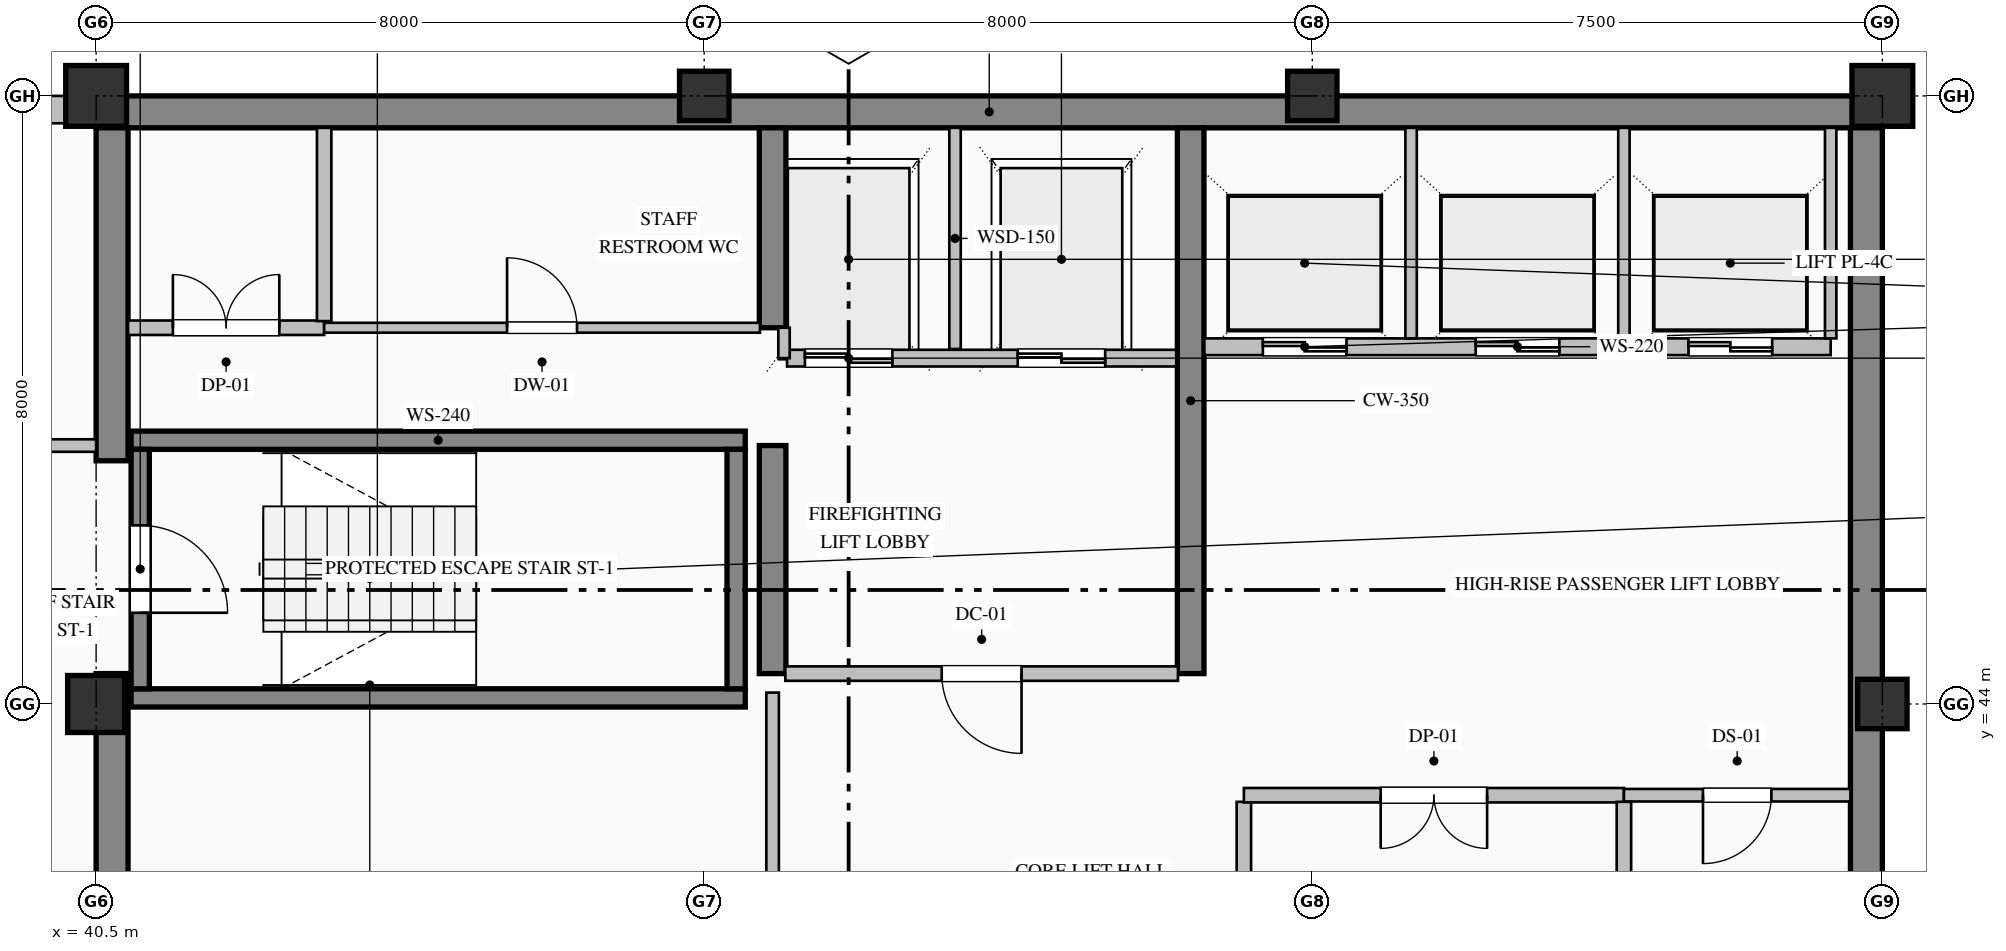
"""IFC4 building model, lengths in metres.
Left out: names, types, materials, properties, quantities, classifications, styles, units other than length and angle.
Written with IfcOpenShell. Run it as: python <this file> out.ifc"""

import sys

from ifc_helpers import new_model, si_unit, direction, frame, frame_2d, origin, origin_2d, place, context, subcontext, project, spatial, rectangle, hollow_rectangle, extrude, element, fill, save


model = new_model("IFC4")
c1 = context("Model", 3, precision=1e-05, world=origin(), true_north=direction((0.0, 1.0)))
c2 = subcontext(c1, "Body", "Model", "MODEL_VIEW")
j1 = project(units=[si_unit("LENGTHUNIT", "METRE"), si_unit("PLANEANGLEUNIT", "RADIAN")], contexts=[c1])
p1 = place(None, origin())
s1 = spatial("IfcSite", under=j1, at=p1, CompositionType="ELEMENT")
p2 = place(p1, origin())
s2 = spatial("IfcBuilding", under=s1, at=p2, CompositionType="ELEMENT")
p3 = place(p2, frame((0.0, 0.0, 327.2)))
s3 = spatial("IfcBuildingStorey", under=s2, at=p3, CompositionType="ELEMENT", Elevation=327.2)
p4 = place(p3, frame((40.5, 51.79, 0.0), z_axis=(0.0, 0.0, 1.0), x_axis=(1.0, 0.0, 0.0)))
e1 = element("IfcWall", 1, at=p4, inside=s3, PredefinedType="SHEAR", context=c2, shape_type="SweptSolid", body=[
    extrude(rectangle(XDim=23.5, YDim=0.42, at=frame_2d((11.75, 0.0))), origin(), (0.0, 0.0, 1.0), 3.785),
])
p5 = place(p3, frame((63.79, 36.32, 0.0), z_axis=(0.0, 0.0, 1.0), x_axis=(0.0, 1.0, 0.0)))
e2 = element("IfcWall", 2, at=p5, inside=s3, PredefinedType="SHEAR", context=c2, shape_type="SweptSolid", body=[
    extrude(rectangle(XDim=15.26, YDim=0.42, at=frame_2d((7.63, 0.0))), origin(), (0.0, 0.0, 1.0), 3.785),
])
p6 = place(p3, frame((40.71, 36.42, 0.0), z_axis=(0.0, 0.0, 1.0), x_axis=(0.0, 1.0, 0.0)))
e3 = element("IfcWall", 3, at=p6, inside=s3, PredefinedType="SHEAR", context=c2, shape_type="SweptSolid", body=[
    extrude(rectangle(XDim=7.98, YDim=0.42, at=frame_2d((3.99, 0.0))), origin(), (0.0, 0.0, 1.0), 3.785),
])
p7 = place(p3, frame((40.71, 47.2, 0.0), z_axis=(0.0, 0.0, 1.0), x_axis=(0.0, 1.0, 0.0)))
e4 = element("IfcWall", 4, at=p7, inside=s3, PredefinedType="SHEAR", context=c2, shape_type="SweptSolid", body=[
    extrude(rectangle(XDim=4.38, YDim=0.42, at=frame_2d((2.19, 0.0))), origin(), (0.0, 0.0, 1.0), 3.785),
])
p8 = place(p3, frame((49.4, 44.4, 0.0), z_axis=(0.0, 0.0, 1.0), x_axis=(0.0, 1.0, 0.0)))
e5 = element("IfcWall", 5, at=p8, inside=s3, PredefinedType="SHEAR", context=c2, shape_type="SweptSolid", body=[
    extrude(rectangle(XDim=3.0, YDim=0.35, at=frame_2d((1.5, 0.0))), origin(), (0.0, 0.0, 1.0), 3.785),
])
p9 = place(p3, frame((49.4, 48.95, 0.0), z_axis=(0.0, 0.0, 1.0), x_axis=(0.0, 1.0, 0.0)))
e6 = element("IfcWall", 6, at=p9, inside=s3, PredefinedType="SHEAR", context=c2, shape_type="SweptSolid", body=[
    extrude(rectangle(XDim=2.63, YDim=0.35, at=frame_2d((1.315, 0.0))), origin(), (0.0, 0.0, 1.0), 3.785),
])
p10 = place(p3, frame((54.9, 44.4, 0.0), z_axis=(0.0, 0.0, 1.0), x_axis=(0.0, 1.0, 0.0)))
e7 = element("IfcWall", 7, at=p10, inside=s3, PredefinedType="SHEAR", context=c2, shape_type="SweptSolid", body=[
    extrude(rectangle(XDim=7.18, YDim=0.35, at=frame_2d((3.59, 0.0))), origin(), (0.0, 0.0, 1.0), 3.785),
])
p11 = place(p3, frame((40.5, 44.0, 0.0), z_axis=(0.0, 0.0, 1.0), x_axis=(1.0, 0.0, 0.0)))
e8 = element("IfcColumn", 8, at=p11, inside=s3, PredefinedType="COLUMN", context=c2, shape_type="SweptSolid", body=[
    extrude(rectangle(XDim=0.75, YDim=0.75, at=origin_2d()), origin(), (0.0, 0.0, 1.0), 4.0),
])
p12 = place(p3, frame((40.5, 52.0, 0.0), z_axis=(0.0, 0.0, 1.0), x_axis=(1.0, 0.0, 0.0)))
e9 = element("IfcColumn", 9, at=p12, inside=s3, PredefinedType="COLUMN", context=c2, shape_type="SweptSolid", body=[
    extrude(hollow_rectangle(XDim=0.8, YDim=0.8, WallThickness=0.032, at=origin_2d()), origin(), (0.0, 0.0, 1.0), 4.0),
])
for number, where, z_axis, x_axis in (
    (10, (48.5, 52.0, 0.0), (0.0, 0.0, 1.0), (1.0, 0.0, 0.0)),
    (11, (56.5, 52.0, 0.0), (0.0, 0.0, 1.0), (1.0, 0.0, 0.0)),
    (12, (64.0, 44.0, 0.0), (0.0, 0.0, 1.0), (1.0, 0.0, 0.0)),
):
    element("IfcColumn", number, at=place(p3, frame(where, z_axis=z_axis, x_axis=x_axis)), inside=s3, PredefinedType="COLUMN", context=c2, shape_type="SweptSolid", body=[
        extrude(hollow_rectangle(XDim=0.65, YDim=0.65, WallThickness=0.028, at=origin_2d()), origin(), (0.0, 0.0, 1.0), 4.0),
    ])
p13 = place(p3, frame((64.0, 52.0, 0.0), z_axis=(0.0, 0.0, 1.0), x_axis=(1.0, 0.0, 0.0)))
e13 = element("IfcColumn", 13, at=p13, inside=s3, PredefinedType="COLUMN", context=c2, shape_type="SweptSolid", body=[
    extrude(hollow_rectangle(XDim=0.8, YDim=0.8, WallThickness=0.032, at=origin_2d()), origin(), (0.0, 0.0, 1.0), 4.0),
])
p14 = place(p3, frame((20.5, 51.82, 0.0), z_axis=(0.0, 0.0, 1.0), x_axis=(1.0, 0.0, 0.0)))
e14 = element("IfcWall", 14, at=p14, inside=s3, PredefinedType="SOLIDWALL", context=c2, shape_type="SweptSolid", body=[
    extrude(rectangle(XDim=20.02, YDim=0.36, at=frame_2d((10.01, 0.0))), origin(), (0.0, 0.0, 1.0), 3.335),
])
p15 = place(p14, frame((6.675, 0.0, 0.8)))
e15 = element("IfcOpeningElement", 15, at=p15, cuts=e14, PredefinedType="OPENING", context=c2, shape_type="SweptSolid", body=[
    extrude(rectangle(XDim=1.05, YDim=2.15, at=frame_2d((0.525, 1.075))), frame((0.0, 0.19, 0.0), z_axis=(0.0, -1.0, 0.0), x_axis=(1.0, 0.0, 0.0)), (0.0, 0.0, 1.0), 0.38),
])
for number, where, z_axis, x_axis in (
    (16, (40.96, 47.47, 0.0), (0.0, 0.0, 1.0), (1.0, 0.0, 0.0)),
    (17, (49.04, 44.08, 0.0), (0.0, 0.0, 1.0), (-1.0, 0.0, 0.0)),
):
    element("IfcWall", number, at=place(p3, frame(where, z_axis=z_axis, x_axis=x_axis)), inside=s3, PredefinedType="SOLIDWALL", context=c2, shape_type="SweptSolid", body=[
        extrude(rectangle(XDim=8.08, YDim=0.24, at=frame_2d((4.04, 0.0))), origin(), (0.0, 0.0, 1.0), 4.0),
    ])
p16 = place(p3, frame((41.08, 47.35, 0.0), z_axis=(0.0, 0.0, 1.0), x_axis=(0.0, -1.0, 0.0)))
e18 = element("IfcWall", 18, at=p16, inside=s3, PredefinedType="SOLIDWALL", context=c2, shape_type="SweptSolid", body=[
    extrude(rectangle(XDim=3.15, YDim=0.24, at=frame_2d((1.575, 0.0))), origin(), (0.0, 0.0, 1.0), 4.0),
])
p17 = place(p16, frame((1.0, 0.0, 0.0)))
e19 = element("IfcOpeningElement", 19, at=p17, cuts=e18, PredefinedType="OPENING", context=c2, shape_type="SweptSolid", body=[
    extrude(rectangle(XDim=1.15, YDim=2.2, at=frame_2d((0.575, 1.1))), frame((0.0, 0.13, 0.0), z_axis=(0.0, -1.0, 0.0), x_axis=(1.0, 0.0, 0.0)), (0.0, 0.0, 1.0), 0.26),
])
p18 = place(p3, frame((48.92, 44.2, 0.0), z_axis=(0.0, 0.0, 1.0), x_axis=(0.0, 1.0, 0.0)))
e20 = element("IfcWall", 20, at=p18, inside=s3, PredefinedType="SOLIDWALL", context=c2, shape_type="SweptSolid", body=[
    extrude(rectangle(XDim=3.15, YDim=0.24, at=frame_2d((1.575, 0.0))), origin(), (0.0, 0.0, 1.0), 4.0),
])
p19 = place(p3, frame((54.71, 48.55, 0.0), z_axis=(0.0, 0.0, 1.0), x_axis=(-1.0, 0.0, 0.0)))
e21 = element("IfcWall", 21, at=p19, inside=s3, PredefinedType="PARTITIONING", context=c2, shape_type="SweptSolid", body=[
    extrude(rectangle(XDim=5.12, YDim=0.22, at=frame_2d((2.56, 0.0))), origin(), (0.0, 0.0, 1.0), 3.785),
])
p20 = place(p19, frame((3.735, 0.0, 0.0)))
e22 = element("IfcOpeningElement", 22, at=p20, cuts=e21, PredefinedType="OPENING", context=c2, shape_type="SweptSolid", body=[
    extrude(rectangle(XDim=1.15, YDim=2.2, at=frame_2d((0.575, 1.1))), frame((0.0, 0.12, 0.0), z_axis=(0.0, -1.0, 0.0), x_axis=(1.0, 0.0, 0.0)), (0.0, 0.0, 1.0), 0.24),
])
p21 = place(p19, frame((0.935, 0.0, 0.0)))
e23 = element("IfcOpeningElement", 23, at=p21, cuts=e21, PredefinedType="OPENING", context=c2, shape_type="SweptSolid", body=[
    extrude(rectangle(XDim=1.15, YDim=2.2, at=frame_2d((0.575, 1.1))), frame((0.0, 0.12, 0.0), z_axis=(0.0, -1.0, 0.0), x_axis=(1.0, 0.0, 0.0)), (0.0, 0.0, 1.0), 0.24),
])
p22 = place(p3, frame((51.8, 48.67, 0.0), z_axis=(0.0, 0.0, 1.0), x_axis=(0.0, 1.0, 0.0)))
e24 = element("IfcWall", 24, at=p22, inside=s3, PredefinedType="PARTITIONING", context=c2, shape_type="SweptSolid", body=[
    extrude(rectangle(XDim=2.91, YDim=0.15, at=frame_2d((1.455, 0.0))), origin(), (0.0, 0.0, 1.0), 3.785),
])
p23 = place(p3, frame((49.55, 48.55, 0.0), z_axis=(0.0, 0.0, 1.0), x_axis=(0.0, 1.0, 0.0)))
e25 = element("IfcWall", 25, at=p23, inside=s3, PredefinedType="PARTITIONING", context=c2, shape_type="SweptSolid", body=[
    extrude(rectangle(XDim=0.4, YDim=0.15, at=frame_2d((0.2, 0.0))), origin(), (0.0, 0.0, 1.0), 3.785),
])
p24 = place(p3, frame((63.32, 48.7, 0.0), z_axis=(0.0, 0.0, 1.0), x_axis=(-1.0, 0.0, 0.0)))
e26 = element("IfcWall", 26, at=p24, inside=s3, PredefinedType="PARTITIONING", context=c2, shape_type="SweptSolid", body=[
    extrude(rectangle(XDim=8.24, YDim=0.22, at=frame_2d((4.12, 0.0))), origin(), (0.0, 0.0, 1.0), 3.785),
])
p25 = place(p24, frame((6.37, 0.0, 0.0)))
e27 = element("IfcOpeningElement", 27, at=p25, cuts=e26, PredefinedType="OPENING", context=c2, shape_type="SweptSolid", body=[
    extrude(rectangle(XDim=1.1, YDim=2.2, at=frame_2d((0.55, 1.1))), frame((0.0, 0.12, 0.0), z_axis=(0.0, -1.0, 0.0), x_axis=(1.0, 0.0, 0.0)), (0.0, 0.0, 1.0), 0.24),
])
p26 = place(p24, frame((3.57, 0.0, 0.0)))
e28 = element("IfcOpeningElement", 28, at=p26, cuts=e26, PredefinedType="OPENING", context=c2, shape_type="SweptSolid", body=[
    extrude(rectangle(XDim=1.1, YDim=2.2, at=frame_2d((0.55, 1.1))), frame((0.0, 0.12, 0.0), z_axis=(0.0, -1.0, 0.0), x_axis=(1.0, 0.0, 0.0)), (0.0, 0.0, 1.0), 0.24),
])
p27 = place(p24, frame((0.77, 0.0, 0.0)))
e29 = element("IfcOpeningElement", 29, at=p27, cuts=e26, PredefinedType="OPENING", context=c2, shape_type="SweptSolid", body=[
    extrude(rectangle(XDim=1.1, YDim=2.2, at=frame_2d((0.55, 1.1))), frame((0.0, 0.12, 0.0), z_axis=(0.0, -1.0, 0.0), x_axis=(1.0, 0.0, 0.0)), (0.0, 0.0, 1.0), 0.24),
])
for number, where, z_axis, x_axis in (
    (30, (57.8, 48.81, 0.0), (0.0, 0.0, 1.0), (0.0, 1.0, 0.0)),
    (31, (60.6, 48.81, 0.0), (0.0, 0.0, 1.0), (0.0, 1.0, 0.0)),
    (32, (63.32, 48.81, 0.0), (0.0, 0.0, 1.0), (0.0, 1.0, 0.0)),
):
    element("IfcWall", number, at=place(p3, frame(where, z_axis=z_axis, x_axis=x_axis)), inside=s3, PredefinedType="PARTITIONING", context=c2, shape_type="SweptSolid", body=[
        extrude(rectangle(XDim=2.77, YDim=0.15, at=frame_2d((1.385, 0.0))), origin(), (0.0, 0.0, 1.0), 3.785),
    ])
p28 = place(p3, frame((37.8, 47.4, 0.0), z_axis=(0.0, 0.0, 1.0), x_axis=(1.0, 0.0, 0.0)))
e33 = element("IfcWall", 33, at=p28, inside=s3, PredefinedType="PARTITIONING", context=c2, shape_type="SweptSolid", body=[
    extrude(rectangle(XDim=2.7, YDim=0.165, at=frame_2d((1.35, 0.0))), origin(), (0.0, 0.0, 1.0), 3.785),
])
p29 = place(p28, frame((0.825, 0.0, 0.0)))
e34 = element("IfcOpeningElement", 34, at=p29, cuts=e33, PredefinedType="OPENING", context=c2, shape_type="SweptSolid", body=[
    extrude(rectangle(XDim=1.05, YDim=2.15, at=frame_2d((0.525, 1.075))), frame((0.0, 0.093, 0.0), z_axis=(0.0, -1.0, 0.0), x_axis=(1.0, 0.0, 0.0)), (0.0, 0.0, 1.0), 0.185),
])
p30 = place(p3, frame((40.92, 48.95, 0.0), z_axis=(0.0, 0.0, 1.0), x_axis=(1.0, 0.0, 0.0)))
e35 = element("IfcWall", 35, at=p30, inside=s3, PredefinedType="PARTITIONING", context=c2, shape_type="SweptSolid", body=[
    extrude(rectangle(XDim=2.58, YDim=0.19, at=frame_2d((1.29, 0.0))), origin(), (0.0, 0.0, 1.0), 3.785),
])
p31 = place(p30, frame((0.59, 0.0, 0.0)))
e36 = element("IfcOpeningElement", 36, at=p31, cuts=e35, PredefinedType="OPENING", context=c2, shape_type="SweptSolid", body=[
    extrude(rectangle(XDim=1.4, YDim=2.25, at=frame_2d((0.7, 1.125))), frame((0.0, 0.105, 0.0), z_axis=(0.0, -1.0, 0.0), x_axis=(1.0, 0.0, 0.0)), (0.0, 0.0, 1.0), 0.21),
])
p32 = place(p3, frame((43.5, 48.95, 0.0), z_axis=(0.0, 0.0, 1.0), x_axis=(1.0, 0.0, 0.0)))
e37 = element("IfcWall", 37, at=p32, inside=s3, PredefinedType="PARTITIONING", context=c2, shape_type="SweptSolid", body=[
    extrude(rectangle(XDim=5.733, YDim=0.13, at=frame_2d((2.866, 0.0))), origin(), (0.0, 0.0, 1.0), 3.785),
])
p33 = place(p32, frame((2.406, 0.0, 0.0)))
e38 = element("IfcOpeningElement", 38, at=p33, cuts=e37, PredefinedType="OPENING", context=c2, shape_type="SweptSolid", body=[
    extrude(rectangle(XDim=0.92, YDim=2.15, at=frame_2d((0.46, 1.075))), frame((0.0, 0.075, 0.0), z_axis=(0.0, -1.0, 0.0), x_axis=(1.0, 0.0, 0.0)), (0.0, 0.0, 1.0), 0.15),
])
p34 = place(p3, frame((54.733, 44.4, 0.0), z_axis=(0.0, 0.0, 1.0), x_axis=(-1.0, 0.0, 0.0)))
e39 = element("IfcWall", 39, at=p34, inside=s3, PredefinedType="PARTITIONING", context=c2, shape_type="SweptSolid", body=[
    extrude(rectangle(XDim=5.166, YDim=0.19, at=frame_2d((2.583, 0.0))), origin(), (0.0, 0.0, 1.0), 3.785),
])
p35 = place(p34, frame((2.058, 0.0, 0.0)))
e40 = element("IfcOpeningElement", 40, at=p35, cuts=e39, PredefinedType="OPENING", context=c2, shape_type="SweptSolid", body=[
    extrude(rectangle(XDim=1.05, YDim=2.15, at=frame_2d((0.525, 1.075))), frame((0.0, 0.105, 0.0), z_axis=(0.0, -1.0, 0.0), x_axis=(1.0, 0.0, 0.0)), (0.0, 0.0, 1.0), 0.21),
])
p36 = place(p3, frame((49.4, 36.42, 0.0), z_axis=(0.0, 0.0, 1.0), x_axis=(0.0, 1.0, 0.0)))
e41 = element("IfcWall", 41, at=p36, inside=s3, PredefinedType="PARTITIONING", context=c2, shape_type="SweptSolid", body=[
    extrude(rectangle(XDim=7.73, YDim=0.165, at=frame_2d((3.865, 0.0))), origin(), (0.0, 0.0, 1.0), 3.027),
])
p37 = place(p36, frame((3.365, 0.0, 0.0)))
e42 = element("IfcOpeningElement", 42, at=p37, cuts=e41, PredefinedType="OPENING", context=c2, shape_type="SweptSolid", body=[
    extrude(rectangle(XDim=1.0, YDim=2.15, at=frame_2d((0.5, 1.075))), frame((0.0, 0.093, 0.0), z_axis=(0.0, -1.0, 0.0), x_axis=(1.0, 0.0, 0.0)), (0.0, 0.0, 1.0), 0.185),
])
p38 = place(p3, frame((55.6, 42.713, 0.0), z_axis=(0.0, 0.0, 1.0), x_axis=(0.0, -1.0, 0.0)))
e43 = element("IfcWall", 43, at=p38, inside=s3, PredefinedType="PARTITIONING", context=c2, shape_type="SweptSolid", body=[
    extrude(rectangle(XDim=2.731, YDim=0.19, at=frame_2d((1.365, 0.0))), origin(), (0.0, 0.0, 1.0), 3.785),
])
p39 = place(p3, frame((60.6, 42.8, 0.0), z_axis=(0.0, 0.0, 1.0), x_axis=(-1.0, 0.0, 0.0)))
e44 = element("IfcWall", 44, at=p39, inside=s3, PredefinedType="PARTITIONING", context=c2, shape_type="SweptSolid", body=[
    extrude(rectangle(XDim=5.0, YDim=0.19, at=frame_2d((2.5, 0.0))), origin(), (0.0, 0.0, 1.0), 3.785),
])
p40 = place(p39, frame((1.8, 0.0, 0.0)))
e45 = element("IfcOpeningElement", 45, at=p40, cuts=e44, PredefinedType="OPENING", context=c2, shape_type="SweptSolid", body=[
    extrude(rectangle(XDim=1.4, YDim=2.25, at=frame_2d((0.7, 1.125))), frame((0.0, 0.105, 0.0), z_axis=(0.0, -1.0, 0.0), x_axis=(1.0, 0.0, 0.0)), (0.0, 0.0, 1.0), 0.21),
])
p41 = place(p3, frame((63.58, 42.8, 0.0), z_axis=(0.0, 0.0, 1.0), x_axis=(-1.0, 0.0, 0.0)))
e46 = element("IfcWall", 46, at=p41, inside=s3, PredefinedType="PARTITIONING", context=c2, shape_type="SweptSolid", body=[
    extrude(rectangle(XDim=2.98, YDim=0.165, at=frame_2d((1.49, 0.0))), origin(), (0.0, 0.0, 1.0), 3.785),
])
p42 = place(p41, frame((1.04, 0.0, 0.0)))
e47 = element("IfcOpeningElement", 47, at=p42, cuts=e46, PredefinedType="OPENING", context=c2, shape_type="SweptSolid", body=[
    extrude(rectangle(XDim=0.9, YDim=2.15, at=frame_2d((0.45, 1.075))), frame((0.0, 0.093, 0.0), z_axis=(0.0, -1.0, 0.0), x_axis=(1.0, 0.0, 0.0)), (0.0, 0.0, 1.0), 0.185),
])
p43 = place(p3, frame((43.5, 51.58, 0.0), z_axis=(0.0, 0.0, 1.0), x_axis=(0.0, -1.0, 0.0)))
e48 = element("IfcWall", 48, at=p43, inside=s3, PredefinedType="PARTITIONING", context=c2, shape_type="SweptSolid", body=[
    extrude(rectangle(XDim=2.543, YDim=0.19, at=frame_2d((1.271, 0.0))), origin(), (0.0, 0.0, 1.0), 3.785),
])
p44 = place(p3, frame((60.6, 42.713, 0.0), z_axis=(0.0, 0.0, 1.0), x_axis=(0.0, -1.0, 0.0)))
e49 = element("IfcWall", 49, at=p44, inside=s3, PredefinedType="PARTITIONING", context=c2, shape_type="SweptSolid", body=[
    extrude(rectangle(XDim=2.731, YDim=0.19, at=frame_2d((1.365, 0.0))), origin(), (0.0, 0.0, 1.0), 3.785),
])
p45 = place(p17, origin())
e50 = element("IfcDoor", 50, at=p45, inside=s3, OperationType="SINGLE_SWING_RIGHT", PredefinedType="DOOR", context=c2, shape_type="SweptSolid", body=[
    extrude(rectangle(XDim=1.15, YDim=2.2, at=frame_2d((0.575, 1.1))), frame((0.0, 0.025, 0.0), z_axis=(0.0, -1.0, 0.0), x_axis=(1.0, 0.0, 0.0)), (0.0, 0.0, 1.0), 0.05),
])
fill(e19, e50)
p46 = place(p20, origin())
e51 = element("IfcDoor", 51, at=p46, inside=s3, OperationType="DOUBLE_DOOR_SLIDING", PredefinedType="DOOR", context=c2, shape_type="SweptSolid", body=[
    extrude(rectangle(XDim=1.15, YDim=2.2, at=frame_2d((0.575, 1.1))), frame((0.0, 0.025, 0.0), z_axis=(0.0, -1.0, 0.0), x_axis=(1.0, 0.0, 0.0)), (0.0, 0.0, 1.0), 0.05),
])
fill(e22, e51)
p47 = place(p21, origin())
e52 = element("IfcDoor", 52, at=p47, inside=s3, OperationType="DOUBLE_DOOR_SLIDING", PredefinedType="DOOR", context=c2, shape_type="SweptSolid", body=[
    extrude(rectangle(XDim=1.15, YDim=2.2, at=frame_2d((0.575, 1.1))), frame((0.0, 0.025, 0.0), z_axis=(0.0, -1.0, 0.0), x_axis=(1.0, 0.0, 0.0)), (0.0, 0.0, 1.0), 0.05),
])
fill(e23, e52)
p48 = place(p25, origin())
e53 = element("IfcDoor", 53, at=p48, inside=s3, OperationType="DOUBLE_DOOR_SLIDING", PredefinedType="DOOR", context=c2, shape_type="SweptSolid", body=[
    extrude(rectangle(XDim=1.1, YDim=2.2, at=frame_2d((0.55, 1.1))), frame((0.0, 0.025, 0.0), z_axis=(0.0, -1.0, 0.0), x_axis=(1.0, 0.0, 0.0)), (0.0, 0.0, 1.0), 0.05),
])
fill(e27, e53)
p49 = place(p26, origin())
e54 = element("IfcDoor", 54, at=p49, inside=s3, OperationType="DOUBLE_DOOR_SLIDING", PredefinedType="DOOR", context=c2, shape_type="SweptSolid", body=[
    extrude(rectangle(XDim=1.1, YDim=2.2, at=frame_2d((0.55, 1.1))), frame((0.0, 0.025, 0.0), z_axis=(0.0, -1.0, 0.0), x_axis=(1.0, 0.0, 0.0)), (0.0, 0.0, 1.0), 0.05),
])
fill(e28, e54)
p50 = place(p27, origin())
e55 = element("IfcDoor", 55, at=p50, inside=s3, OperationType="DOUBLE_DOOR_SLIDING", PredefinedType="DOOR", context=c2, shape_type="SweptSolid", body=[
    extrude(rectangle(XDim=1.1, YDim=2.2, at=frame_2d((0.55, 1.1))), frame((0.0, 0.025, 0.0), z_axis=(0.0, -1.0, 0.0), x_axis=(1.0, 0.0, 0.0)), (0.0, 0.0, 1.0), 0.05),
])
fill(e29, e55)
p51 = place(p35, origin())
e56 = element("IfcDoor", 56, at=p51, inside=s3, OperationType="SINGLE_SWING_LEFT", PredefinedType="DOOR", context=c2, shape_type="SweptSolid", body=[
    extrude(rectangle(XDim=1.05, YDim=2.15, at=frame_2d((0.525, 1.075))), frame((0.0, 0.025, 0.0), z_axis=(0.0, -1.0, 0.0), x_axis=(1.0, 0.0, 0.0)), (0.0, 0.0, 1.0), 0.05),
])
fill(e40, e56)
p52 = place(p31, origin())
e57 = element("IfcDoor", 57, at=p52, inside=s3, OperationType="DOUBLE_DOOR_SINGLE_SWING", PredefinedType="DOOR", context=c2, shape_type="SweptSolid", body=[
    extrude(rectangle(XDim=1.4, YDim=2.25, at=frame_2d((0.7, 1.125))), frame((0.0, 0.025, 0.0), z_axis=(0.0, -1.0, 0.0), x_axis=(1.0, 0.0, 0.0)), (0.0, 0.0, 1.0), 0.05),
])
fill(e36, e57)
p53 = place(p33, origin())
e58 = element("IfcDoor", 58, at=p53, inside=s3, OperationType="SINGLE_SWING_LEFT", PredefinedType="DOOR", context=c2, shape_type="SweptSolid", body=[
    extrude(rectangle(XDim=0.92, YDim=2.15, at=frame_2d((0.46, 1.075))), frame((0.0, 0.025, 0.0), z_axis=(0.0, -1.0, 0.0), x_axis=(1.0, 0.0, 0.0)), (0.0, 0.0, 1.0), 0.05),
])
fill(e38, e58)
p54 = place(p40, origin())
e59 = element("IfcDoor", 59, at=p54, inside=s3, OperationType="DOUBLE_DOOR_SINGLE_SWING", PredefinedType="DOOR", context=c2, shape_type="SweptSolid", body=[
    extrude(rectangle(XDim=1.4, YDim=2.25, at=frame_2d((0.7, 1.125))), frame((0.0, 0.025, 0.0), z_axis=(0.0, -1.0, 0.0), x_axis=(1.0, 0.0, 0.0)), (0.0, 0.0, 1.0), 0.05),
])
fill(e45, e59)
p55 = place(p42, origin())
e60 = element("IfcDoor", 60, at=p55, inside=s3, OperationType="SINGLE_SWING_RIGHT", PredefinedType="DOOR", context=c2, shape_type="SweptSolid", body=[
    extrude(rectangle(XDim=0.9, YDim=2.15, at=frame_2d((0.45, 1.075))), frame((0.0, 0.025, 0.0), z_axis=(0.0, -1.0, 0.0), x_axis=(1.0, 0.0, 0.0)), (0.0, 0.0, 1.0), 0.05),
])
fill(e47, e60)
save(model, sys.argv[1])
